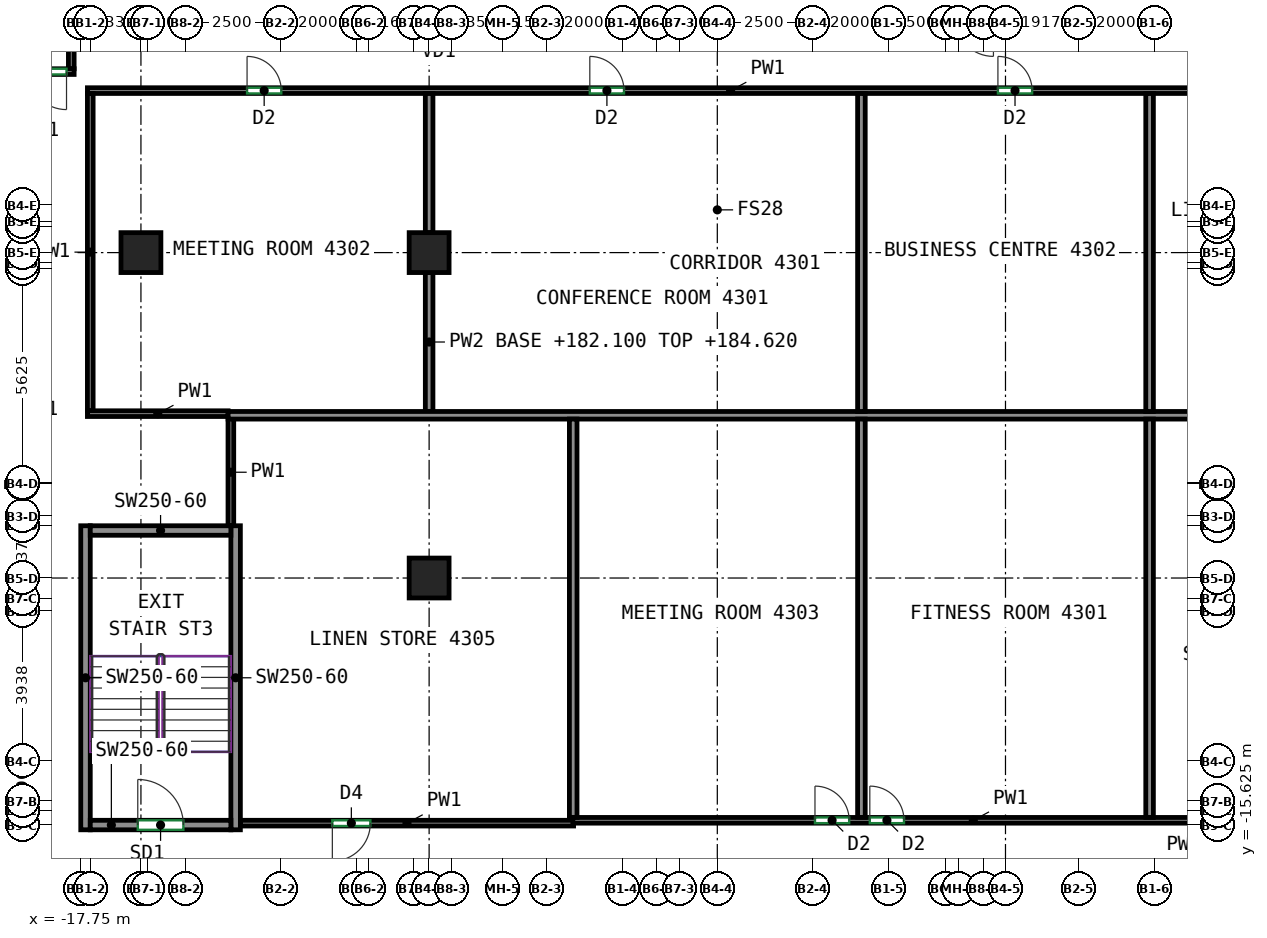
"""IFC4 building model, lengths in metres.
Left out: names, types, materials, properties, quantities, classifications, styles, units other than length and angle.
Written with IfcOpenShell. Run it as: python <this file> out.ifc"""

import sys

from ifc_helpers import new_model, si_unit, direction, frame, frame_2d, origin, origin_2d, place, context, subcontext, project, spatial, rectangle, extrude, source, transform, mapped, element, fill, save


model = new_model("IFC4")
c1 = context("Model", 3, precision=1e-05, world=origin(), true_north=direction((0.0, 1.0)))
c2 = subcontext(c1, "Body", "Model", "MODEL_VIEW")
j1 = project(units=[si_unit("LENGTHUNIT", "METRE"), si_unit("PLANEANGLEUNIT", "RADIAN")], contexts=[c1])
p1 = place(None, origin())
s1 = spatial("IfcSite", under=j1, at=p1, CompositionType="ELEMENT")
p2 = place(p1, origin())
s2 = spatial("IfcBuilding", under=s1, at=p2, CompositionType="ELEMENT")
p3 = place(p2, frame((0.0, 0.0, 182.1)))
s3 = spatial("IfcBuildingStorey", under=s2, at=p3, CompositionType="ELEMENT", Elevation=182.1)
m1 = source(origin(), c2, "Body", "SweptSolid", [
    extrude(rectangle(XDim=1.05, YDim=1.05, at=origin_2d()), origin(), (0.0, 0.0, 1.0), 3.12),
])
for number, where, z_axis, x_axis in (
    (1, (-16.167, -0.562, 0.0), (0.0, 0.0, 1.0), (1.0, 0.0, 0.0)),
    (2, (-8.583, -9.125, 0.0), (0.0, 0.0, 1.0), (1.0, 0.0, 0.0)),
    (3, (-8.583, -0.562, 0.0), (0.0, 0.0, 1.0), (1.0, 0.0, 0.0)),
):
    element("IfcColumn", number, at=place(p3, frame(where, z_axis=z_axis, x_axis=x_axis)), inside=s3, PredefinedType="COLUMN", context=c2, shape_type="MappedRepresentation", body=[
        mapped(m1, transform((0.0, 0.0, 0.0))),
    ])
m2 = source(origin(), c2, "Body", "SweptSolid", [
    extrude(rectangle(XDim=8.0, YDim=0.25, at=frame_2d((4.0, 0.0))), origin(), (0.0, 0.0, 1.0), 3.12),
])
for number, where, z_axis, x_axis in (
    (4, (-17.625, -15.75, 0.0), (0.0, 0.0, 1.0), (0.0, 1.0, 0.0)),
    (5, (-13.675, -15.75, 0.0), (0.0, 0.0, 1.0), (0.0, 1.0, 0.0)),
):
    element("IfcWall", number, at=place(p3, frame(where, z_axis=z_axis, x_axis=x_axis)), inside=s3, PredefinedType="SHEAR", context=c2, shape_type="MappedRepresentation", body=[
        mapped(m2, transform((0.0, 0.0, 0.0))),
    ])
m3 = source(origin(), c2, "Body", "SweptSolid", [
    extrude(rectangle(XDim=3.7, YDim=0.25, at=frame_2d((1.85, 0.0))), origin(), (0.0, 0.0, 1.0), 3.12),
])
p4 = place(p3, frame((-17.5, -15.625, 0.0), z_axis=(0.0, 0.0, 1.0), x_axis=(1.0, 0.0, 0.0)))
e6 = element("IfcWall", 6, at=p4, inside=s3, PredefinedType="SHEAR", context=c2, shape_type="MappedRepresentation", body=[
    mapped(m3, transform((0.0, 0.0, 0.0))),
])
p5 = place(p4, frame((1.25, 0.0, 0.0)))
e7 = element("IfcOpeningElement", 7, at=p5, cuts=e6, PredefinedType="OPENING", context=c2, shape_type="SweptSolid", body=[
    extrude(rectangle(XDim=1.2, YDim=2.1, at=frame_2d((0.6, 1.05))), frame((0.0, 0.135, 0.0), z_axis=(0.0, -1.0, 0.0), x_axis=(1.0, 0.0, 0.0)), (0.0, 0.0, 1.0), 0.27),
])
p6 = place(p3, frame((-17.5, -7.875, 0.0), z_axis=(0.0, 0.0, 1.0), x_axis=(1.0, 0.0, 0.0)))
e8 = element("IfcWall", 8, at=p6, inside=s3, PredefinedType="SHEAR", context=c2, shape_type="MappedRepresentation", body=[
    mapped(m3, transform((0.0, 0.0, 0.0))),
])
p7 = place(p3, frame((-17.925, 4.2, 0.0), z_axis=(0.0, 0.0, 1.0), x_axis=(-1.0, 0.0, 0.0)))
e9 = element("IfcWall", 9, at=p7, inside=s3, PredefinedType="PARTITIONING", context=c2, shape_type="SweptSolid", body=[
    extrude(rectangle(XDim=2.109, YDim=0.15, at=frame_2d((1.054, 0.0))), origin(), (0.0, 0.0, 1.0), 3.12),
])
p8 = place(p7, frame((0.2, 0.0, 0.0)))
e10 = element("IfcOpeningElement", 10, at=p8, cuts=e9, PredefinedType="OPENING", context=c2, shape_type="SweptSolid", body=[
    extrude(rectangle(XDim=1.0, YDim=2.1, at=frame_2d((0.5, 1.05))), frame((0.0, 0.085, 0.0), z_axis=(0.0, -1.0, 0.0), x_axis=(1.0, 0.0, 0.0)), (0.0, 0.0, 1.0), 0.17),
])
p9 = place(p3, frame((-18.0, 4.275, 0.0), z_axis=(0.0, 0.0, 1.0), x_axis=(0.0, 1.0, 0.0)))
e11 = element("IfcWall", 11, at=p9, inside=s3, PredefinedType="PARTITIONING", context=c2, shape_type="SweptSolid", body=[
    extrude(rectangle(XDim=1.485, YDim=0.15, at=frame_2d((0.743, 0.0))), origin(), (0.0, 0.0, 1.0), 3.12),
])
p10 = place(p3, frame((-17.575, 3.7, 0.0), z_axis=(0.0, 0.0, 1.0), x_axis=(1.0, 0.0, 0.0)))
e12 = element("IfcWall", 12, at=p10, inside=s3, PredefinedType="PARTITIONING", context=c2, shape_type="SweptSolid", body=[
    extrude(rectangle(XDim=33.85, YDim=0.15, at=frame_2d((16.925, 0.0))), origin(), (0.0, 0.0, 1.0), 3.12),
])
p11 = place(p10, frame((4.201, 0.0, 0.0)))
e13 = element("IfcOpeningElement", 13, at=p11, cuts=e12, PredefinedType="OPENING", context=c2, shape_type="SweptSolid", body=[
    extrude(rectangle(XDim=0.9, YDim=2.1, at=frame_2d((0.45, 1.05))), frame((0.0, 0.085, 0.0), z_axis=(0.0, -1.0, 0.0), x_axis=(1.0, 0.0, 0.0)), (0.0, 0.0, 1.0), 0.17),
])
p12 = place(p10, frame((13.22, 0.0, 0.0)))
e14 = element("IfcOpeningElement", 14, at=p12, cuts=e12, PredefinedType="OPENING", context=c2, shape_type="SweptSolid", body=[
    extrude(rectangle(XDim=0.9, YDim=2.1, at=frame_2d((0.45, 1.05))), frame((0.0, 0.085, 0.0), z_axis=(0.0, -1.0, 0.0), x_axis=(1.0, 0.0, 0.0)), (0.0, 0.0, 1.0), 0.17),
])
p13 = place(p10, frame((23.959, 0.0, 0.0)))
e15 = element("IfcOpeningElement", 15, at=p13, cuts=e12, PredefinedType="OPENING", context=c2, shape_type="SweptSolid", body=[
    extrude(rectangle(XDim=0.9, YDim=2.1, at=frame_2d((0.45, 1.05))), frame((0.0, 0.085, 0.0), z_axis=(0.0, -1.0, 0.0), x_axis=(1.0, 0.0, 0.0)), (0.0, 0.0, 1.0), 0.17),
])
p14 = place(p3, frame((-17.5, -4.725, 0.0), z_axis=(0.0, 0.0, 1.0), x_axis=(0.0, 1.0, 0.0)))
e16 = element("IfcWall", 16, at=p14, inside=s3, PredefinedType="PARTITIONING", context=c2, shape_type="SweptSolid", body=[
    extrude(rectangle(XDim=8.35, YDim=0.15, at=frame_2d((4.175, 0.0))), origin(), (0.0, 0.0, 1.0), 3.12),
])
p15 = place(p3, frame((-17.575, -4.8, 0.0), z_axis=(0.0, 0.0, 1.0), x_axis=(1.0, 0.0, 0.0)))
e17 = element("IfcWall", 17, at=p15, inside=s3, PredefinedType="PARTITIONING", context=c2, shape_type="SweptSolid", body=[
    extrude(rectangle(XDim=3.702, YDim=0.15, at=frame_2d((1.851, 0.0))), origin(), (0.0, 0.0, 1.0), 3.12),
])
p16 = place(p3, frame((-13.8, -7.75, 0.0), z_axis=(0.0, 0.0, 1.0), x_axis=(0.0, 1.0, 0.0)))
e18 = element("IfcWall", 18, at=p16, inside=s3, PredefinedType="PARTITIONING", context=c2, shape_type="SweptSolid", body=[
    extrude(rectangle(XDim=2.817, YDim=0.15, at=frame_2d((1.408, 0.0))), origin(), (0.0, 0.0, 1.0), 3.12),
])
p17 = place(p3, frame((-4.782, -15.575, 0.0), z_axis=(0.0, 0.0, 1.0), x_axis=(-1.0, 0.0, 0.0)))
e19 = element("IfcWall", 19, at=p17, inside=s3, PredefinedType="PARTITIONING", context=c2, shape_type="SweptSolid", body=[
    extrude(rectangle(XDim=8.768, YDim=0.15, at=frame_2d((4.384, 0.0))), origin(), (0.0, 0.0, 1.0), 3.12),
])
p18 = place(p17, frame((5.348, 0.0, 0.0)))
e20 = element("IfcOpeningElement", 20, at=p18, cuts=e19, PredefinedType="OPENING", context=c2, shape_type="SweptSolid", body=[
    extrude(rectangle(XDim=1.0, YDim=2.1, at=frame_2d((0.5, 1.05))), frame((0.0, 0.085, 0.0), z_axis=(0.0, -1.0, 0.0), x_axis=(1.0, 0.0, 0.0)), (0.0, 0.0, 1.0), 0.17),
])
p19 = place(p3, frame((-4.802, -15.5, 0.0), z_axis=(0.0, 0.0, 1.0), x_axis=(1.0, 0.0, 0.0)))
e21 = element("IfcWall", 21, at=p19, inside=s3, PredefinedType="PARTITIONING", context=c2, shape_type="SweptSolid", body=[
    extrude(rectangle(XDim=21.077, YDim=0.15, at=frame_2d((10.539, 0.0))), origin(), (0.0, 0.0, 1.0), 3.12),
])
p20 = place(p19, frame((6.372, 0.0, 0.0)))
e22 = element("IfcOpeningElement", 22, at=p20, cuts=e21, PredefinedType="OPENING", context=c2, shape_type="SweptSolid", body=[
    extrude(rectangle(XDim=0.9, YDim=2.1, at=frame_2d((0.45, 1.05))), frame((0.0, 0.085, 0.0), z_axis=(0.0, -1.0, 0.0), x_axis=(1.0, 0.0, 0.0)), (0.0, 0.0, 1.0), 0.17),
])
p21 = place(p19, frame((7.815, 0.0, 0.0)))
e23 = element("IfcOpeningElement", 23, at=p21, cuts=e21, PredefinedType="OPENING", context=c2, shape_type="SweptSolid", body=[
    extrude(rectangle(XDim=0.9, YDim=2.1, at=frame_2d((0.45, 1.05))), frame((0.0, 0.085, 0.0), z_axis=(0.0, -1.0, 0.0), x_axis=(1.0, 0.0, 0.0)), (0.0, 0.0, 1.0), 0.17),
])
p22 = place(p3, frame((-8.583, -0.037, 0.0), z_axis=(0.0, 0.0, 1.0), x_axis=(0.0, 1.0, 0.0)))
e24 = element("IfcWall", 24, at=p22, inside=s3, PredefinedType="PARTITIONING", context=c2, shape_type="SweptSolid", body=[
    extrude(rectangle(XDim=3.66, YDim=0.2, at=frame_2d((1.83, 0.0))), origin(), (0.0, 0.0, 1.0), 3.12),
])
p23 = place(p3, frame((-8.583, -4.743, 0.0), z_axis=(0.0, 0.0, 1.0), x_axis=(0.0, 1.0, 0.0)))
e25 = element("IfcWall", 25, at=p23, inside=s3, PredefinedType="PARTITIONING", context=c2, shape_type="SweptSolid", body=[
    extrude(rectangle(XDim=3.656, YDim=0.2, at=frame_2d((1.828, 0.0))), origin(), (0.0, 0.0, 1.0), 2.52),
])
p24 = place(p3, frame((-13.873, -4.843, 0.0), z_axis=(0.0, 0.0, 1.0), x_axis=(1.0, 0.0, 0.0)))
e26 = element("IfcWall", 26, at=p24, inside=s3, PredefinedType="PARTITIONING", context=c2, shape_type="SweptSolid", body=[
    extrude(rectangle(XDim=30.146, YDim=0.2, at=frame_2d((15.073, 0.0))), origin(), (0.0, 0.0, 1.0), 3.12),
])
for number, where, z_axis, x_axis in (
    (27, (2.792, -4.743, 0.0), (0.0, 0.0, 1.0), (0.0, 1.0, 0.0)),
    (28, (10.375, -4.743, 0.0), (0.0, 0.0, 1.0), (0.0, 1.0, 0.0)),
):
    element("IfcWall", number, at=place(p3, frame(where, z_axis=z_axis, x_axis=x_axis)), inside=s3, PredefinedType="PARTITIONING", context=c2, shape_type="SweptSolid", body=[
        extrude(rectangle(XDim=8.366, YDim=0.2, at=frame_2d((4.183, 0.0))), origin(), (0.0, 0.0, 1.0), 3.12),
    ])
for number, where, z_axis, x_axis in (
    (29, (-4.792, -15.423, 0.0), (0.0, 0.0, 1.0), (0.0, 1.0, 0.0)),
    (30, (2.792, -15.423, 0.0), (0.0, 0.0, 1.0), (0.0, 1.0, 0.0)),
    (31, (10.375, -15.423, 0.0), (0.0, 0.0, 1.0), (0.0, 1.0, 0.0)),
):
    element("IfcWall", number, at=place(p3, frame(where, z_axis=z_axis, x_axis=x_axis)), inside=s3, PredefinedType="PARTITIONING", context=c2, shape_type="SweptSolid", body=[
        extrude(rectangle(XDim=10.48, YDim=0.2, at=frame_2d((5.24, 0.0))), origin(), (0.0, 0.0, 1.0), 3.12),
    ])
p25 = place(p5, origin())
e32 = element("IfcDoor", 32, at=p25, inside=s3, OperationType="DOUBLE_DOOR_SINGLE_SWING", PredefinedType="DOOR", context=c2, shape_type="SweptSolid", body=[
    extrude(rectangle(XDim=1.2, YDim=2.1, at=frame_2d((0.6, 1.05))), frame((0.0, 0.025, 0.0), z_axis=(0.0, -1.0, 0.0), x_axis=(1.0, 0.0, 0.0)), (0.0, 0.0, 1.0), 0.05),
])
fill(e7, e32)
p26 = place(p18, origin())
e33 = element("IfcDoor", 33, at=p26, inside=s3, OperationType="SINGLE_SWING_RIGHT", PredefinedType="DOOR", context=c2, shape_type="SweptSolid", body=[
    extrude(rectangle(XDim=1.0, YDim=2.1, at=frame_2d((0.5, 1.05))), frame((0.0, 0.025, 0.0), z_axis=(0.0, -1.0, 0.0), x_axis=(1.0, 0.0, 0.0)), (0.0, 0.0, 1.0), 0.05),
])
fill(e20, e33)
p27 = place(p20, origin())
e34 = element("IfcDoor", 34, at=p27, inside=s3, OperationType="SINGLE_SWING_LEFT", PredefinedType="DOOR", context=c2, shape_type="SweptSolid", body=[
    extrude(rectangle(XDim=0.9, YDim=2.1, at=frame_2d((0.45, 1.05))), frame((0.0, 0.025, 0.0), z_axis=(0.0, -1.0, 0.0), x_axis=(1.0, 0.0, 0.0)), (0.0, 0.0, 1.0), 0.05),
])
fill(e22, e34)
p28 = place(p21, origin())
e35 = element("IfcDoor", 35, at=p28, inside=s3, OperationType="SINGLE_SWING_LEFT", PredefinedType="DOOR", context=c2, shape_type="SweptSolid", body=[
    extrude(rectangle(XDim=0.9, YDim=2.1, at=frame_2d((0.45, 1.05))), frame((0.0, 0.025, 0.0), z_axis=(0.0, -1.0, 0.0), x_axis=(1.0, 0.0, 0.0)), (0.0, 0.0, 1.0), 0.05),
])
fill(e23, e35)
p29 = place(p11, origin())
e36 = element("IfcDoor", 36, at=p29, inside=s3, OperationType="SINGLE_SWING_LEFT", PredefinedType="DOOR", context=c2, shape_type="SweptSolid", body=[
    extrude(rectangle(XDim=0.9, YDim=2.1, at=frame_2d((0.45, 1.05))), frame((0.0, 0.025, 0.0), z_axis=(0.0, -1.0, 0.0), x_axis=(1.0, 0.0, 0.0)), (0.0, 0.0, 1.0), 0.05),
])
fill(e13, e36)
p30 = place(p12, origin())
e37 = element("IfcDoor", 37, at=p30, inside=s3, OperationType="SINGLE_SWING_LEFT", PredefinedType="DOOR", context=c2, shape_type="SweptSolid", body=[
    extrude(rectangle(XDim=0.9, YDim=2.1, at=frame_2d((0.45, 1.05))), frame((0.0, 0.025, 0.0), z_axis=(0.0, -1.0, 0.0), x_axis=(1.0, 0.0, 0.0)), (0.0, 0.0, 1.0), 0.05),
])
fill(e14, e37)
p31 = place(p13, origin())
e38 = element("IfcDoor", 38, at=p31, inside=s3, OperationType="SINGLE_SWING_LEFT", PredefinedType="DOOR", context=c2, shape_type="SweptSolid", body=[
    extrude(rectangle(XDim=0.9, YDim=2.1, at=frame_2d((0.45, 1.05))), frame((0.0, 0.025, 0.0), z_axis=(0.0, -1.0, 0.0), x_axis=(1.0, 0.0, 0.0)), (0.0, 0.0, 1.0), 0.05),
])
fill(e15, e38)
p32 = place(p8, origin())
e39 = element("IfcDoor", 39, at=p32, inside=s3, OperationType="SINGLE_SWING_LEFT", PredefinedType="DOOR", context=c2, shape_type="SweptSolid", body=[
    extrude(rectangle(XDim=1.0, YDim=2.1, at=frame_2d((0.5, 1.05))), frame((0.0, 0.025, 0.0), z_axis=(0.0, -1.0, 0.0), x_axis=(1.0, 0.0, 0.0)), (0.0, 0.0, 1.0), 0.05),
])
fill(e10, e39)
save(model, sys.argv[1])
